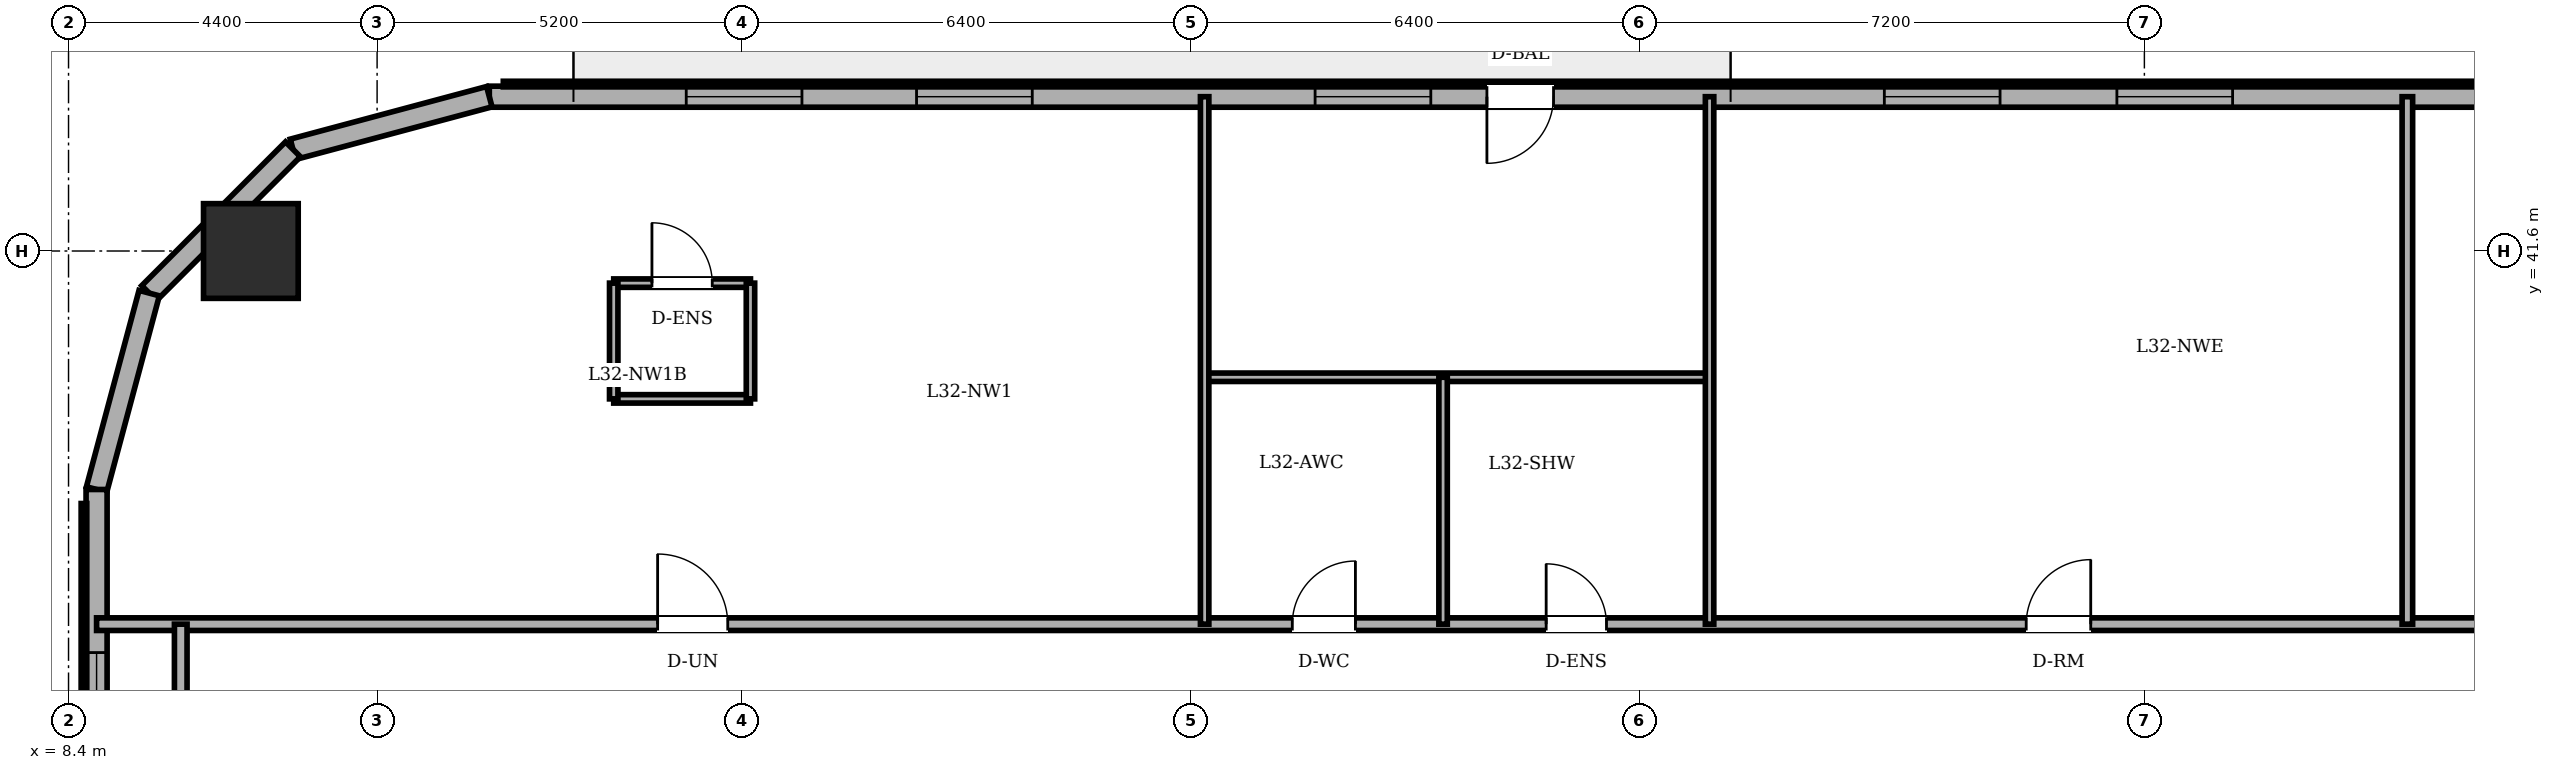
"""IFC4 building model, lengths in metres.
Left out: names, types, materials, properties, quantities, classifications, styles, units other than length and angle.
Written with IfcOpenShell. Run it as: python <this file> out.ifc"""

import sys

from ifc_helpers import new_model, si_unit, direction, frame, frame_2d, origin, origin_2d, place, context, subcontext, project, spatial, rectangle, circle, extrude, element, fill, save


model = new_model("IFC4")
c1 = context("Model", 3, precision=1e-05, world=origin(), true_north=direction((0.0, 1.0)))
c2 = subcontext(c1, "Body", "Model", "MODEL_VIEW")
j1 = project(units=[si_unit("LENGTHUNIT", "METRE"), si_unit("PLANEANGLEUNIT", "RADIAN")], contexts=[c1])
p1 = place(None, origin())
s1 = spatial("IfcSite", under=j1, at=p1, CompositionType="ELEMENT")
p2 = place(p1, origin())
s2 = spatial("IfcBuilding", under=s1, at=p2, CompositionType="ELEMENT")
p3 = place(p2, frame((0.0, 0.0, 122.3)))
s3 = spatial("IfcBuildingStorey", under=s2, at=p3, CompositionType="ELEMENT", Elevation=122.3)
p4 = place(p3, frame((11.0, 41.6, 0.0), z_axis=(0.0, 0.0, 1.0), x_axis=(1.0, 0.0, 0.0)))
e1 = element("IfcColumn", 1, at=p4, inside=s3, PredefinedType="COLUMN", context=c2, shape_type="SweptSolid", body=[
    extrude(circle(Radius=0.675, at=origin_2d()), origin(), (0.0, 0.0, 1.0), 3.6),
])
p5 = place(p3, frame((44.333, 43.8, 0.0), z_axis=(0.0, 0.0, 1.0), x_axis=(-1.0, 0.0, 0.0)))
e2 = element("IfcWall", 2, at=p5, inside=s3, PredefinedType="SOLIDWALL", context=c2, shape_type="SweptSolid", body=[
    extrude(rectangle(XDim=29.933, YDim=0.3, at=frame_2d((14.967, 0.0))), origin(), (0.0, 0.0, 1.0), 3.4),
])
p6 = place(p5, frame((14.758, 0.0, 0.0)))
e3 = element("IfcOpeningElement", 3, at=p6, cuts=e2, PredefinedType="OPENING", context=c2, shape_type="SweptSolid", body=[
    extrude(rectangle(XDim=0.95, YDim=2.2, at=frame_2d((0.475, 1.1))), frame((0.0, 0.16, 0.0), z_axis=(0.0, -1.0, 0.0), x_axis=(1.0, 0.0, 0.0)), (0.0, 0.0, 1.0), 0.32),
])
p7 = place(p5, frame((5.075, 0.0, 0.85)))
e4 = element("IfcOpeningElement", 4, at=p7, cuts=e2, PredefinedType="OPENING", context=c2, shape_type="SweptSolid", body=[
    extrude(rectangle(XDim=1.65, YDim=1.55, at=frame_2d((0.825, 0.775))), frame((0.0, 0.16, 0.0), z_axis=(0.0, -1.0, 0.0), x_axis=(1.0, 0.0, 0.0)), (0.0, 0.0, 1.0), 0.32),
])
p8 = place(p5, frame((8.391, 0.0, 0.85)))
e5 = element("IfcOpeningElement", 5, at=p8, cuts=e2, PredefinedType="OPENING", context=c2, shape_type="SweptSolid", body=[
    extrude(rectangle(XDim=1.65, YDim=1.55, at=frame_2d((0.825, 0.775))), frame((0.0, 0.16, 0.0), z_axis=(0.0, -1.0, 0.0), x_axis=(1.0, 0.0, 0.0)), (0.0, 0.0, 1.0), 0.32),
])
p9 = place(p5, frame((16.508, 0.0, 0.85)))
e6 = element("IfcOpeningElement", 6, at=p9, cuts=e2, PredefinedType="OPENING", context=c2, shape_type="SweptSolid", body=[
    extrude(rectangle(XDim=1.65, YDim=1.55, at=frame_2d((0.825, 0.775))), frame((0.0, 0.16, 0.0), z_axis=(0.0, -1.0, 0.0), x_axis=(1.0, 0.0, 0.0)), (0.0, 0.0, 1.0), 0.32),
])
p10 = place(p5, frame((22.191, 0.0, 0.85)))
e7 = element("IfcOpeningElement", 7, at=p10, cuts=e2, PredefinedType="OPENING", context=c2, shape_type="SweptSolid", body=[
    extrude(rectangle(XDim=1.65, YDim=1.55, at=frame_2d((0.825, 0.775))), frame((0.0, 0.16, 0.0), z_axis=(0.0, -1.0, 0.0), x_axis=(1.0, 0.0, 0.0)), (0.0, 0.0, 1.0), 0.32),
])
p11 = place(p5, frame((25.475, 0.0, 0.85)))
e8 = element("IfcOpeningElement", 8, at=p11, cuts=e2, PredefinedType="OPENING", context=c2, shape_type="SweptSolid", body=[
    extrude(rectangle(XDim=1.65, YDim=1.55, at=frame_2d((0.825, 0.775))), frame((0.0, 0.16, 0.0), z_axis=(0.0, -1.0, 0.0), x_axis=(1.0, 0.0, 0.0)), (0.0, 0.0, 1.0), 0.32),
])
p12 = place(p3, frame((14.4, 43.8, 0.0), z_axis=(0.0, 0.0, 1.0), x_axis=(-0.965943540406, -0.258752926066, 0.0)))
e9 = element("IfcWall", 9, at=p12, inside=s3, PredefinedType="SOLIDWALL", context=c2, shape_type="SweptSolid", body=[
    extrude(rectangle(XDim=2.898, YDim=0.3, at=frame_2d((1.449, 0.0))), origin(), (0.0, 0.0, 1.0), 3.4),
])
p13 = place(p3, frame((11.6, 43.05, 0.0), z_axis=(0.0, 0.0, 1.0), x_axis=(-0.707106781187, -0.707106781187, 0.0)))
e10 = element("IfcWall", 10, at=p13, inside=s3, PredefinedType="SOLIDWALL", context=c2, shape_type="SweptSolid", body=[
    extrude(rectangle(XDim=2.899, YDim=0.3, at=frame_2d((1.45, 0.0))), origin(), (0.0, 0.0, 1.0), 3.4),
])
p14 = place(p3, frame((9.55, 41.0, 0.0), z_axis=(0.0, 0.0, 1.0), x_axis=(-0.258731875344, -0.96594917914, 0.0)))
e11 = element("IfcWall", 11, at=p14, inside=s3, PredefinedType="SOLIDWALL", context=c2, shape_type="SweptSolid", body=[
    extrude(rectangle(XDim=2.899, YDim=0.3, at=frame_2d((1.449, 0.0))), origin(), (0.0, 0.0, 1.0), 3.4),
])
p15 = place(p3, frame((8.8, 38.2, 0.0), z_axis=(0.0, 0.0, 1.0), x_axis=(0.0, -1.0, 0.0)))
e12 = element("IfcWall", 12, at=p15, inside=s3, PredefinedType="SOLIDWALL", context=c2, shape_type="SweptSolid", body=[
    extrude(rectangle(XDim=28.4, YDim=0.3, at=frame_2d((14.2, 0.0))), origin(), (0.0, 0.0, 1.0), 3.4),
])
p16 = place(p15, frame((2.325, 0.0, 0.85)))
e13 = element("IfcOpeningElement", 13, at=p16, cuts=e12, PredefinedType="OPENING", context=c2, shape_type="SweptSolid", body=[
    extrude(rectangle(XDim=1.65, YDim=1.55, at=frame_2d((0.825, 0.775))), frame((0.0, 0.16, 0.0), z_axis=(0.0, -1.0, 0.0), x_axis=(1.0, 0.0, 0.0)), (0.0, 0.0, 1.0), 0.32),
])
p17 = place(p15, frame((6.828, 0.0, 0.85)))
e14 = element("IfcOpeningElement", 14, at=p17, cuts=e12, PredefinedType="OPENING", context=c2, shape_type="SweptSolid", body=[
    extrude(rectangle(XDim=1.65, YDim=1.55, at=frame_2d((0.825, 0.775))), frame((0.0, 0.16, 0.0), z_axis=(0.0, -1.0, 0.0), x_axis=(1.0, 0.0, 0.0)), (0.0, 0.0, 1.0), 0.32),
])
p18 = place(p15, frame((10.102, 0.0, 0.85)))
e15 = element("IfcOpeningElement", 15, at=p18, cuts=e12, PredefinedType="OPENING", context=c2, shape_type="SweptSolid", body=[
    extrude(rectangle(XDim=1.65, YDim=1.55, at=frame_2d((0.825, 0.775))), frame((0.0, 0.16, 0.0), z_axis=(0.0, -1.0, 0.0), x_axis=(1.0, 0.0, 0.0)), (0.0, 0.0, 1.0), 0.32),
])
p19 = place(p15, frame((16.648, 0.0, 0.85)))
e16 = element("IfcOpeningElement", 16, at=p19, cuts=e12, PredefinedType="OPENING", context=c2, shape_type="SweptSolid", body=[
    extrude(rectangle(XDim=1.65, YDim=1.55, at=frame_2d((0.825, 0.775))), frame((0.0, 0.16, 0.0), z_axis=(0.0, -1.0, 0.0), x_axis=(1.0, 0.0, 0.0)), (0.0, 0.0, 1.0), 0.32),
])
p20 = place(p15, frame((19.922, 0.0, 0.85)))
e17 = element("IfcOpeningElement", 17, at=p20, cuts=e12, PredefinedType="OPENING", context=c2, shape_type="SweptSolid", body=[
    extrude(rectangle(XDim=1.65, YDim=1.55, at=frame_2d((0.825, 0.775))), frame((0.0, 0.16, 0.0), z_axis=(0.0, -1.0, 0.0), x_axis=(1.0, 0.0, 0.0)), (0.0, 0.0, 1.0), 0.32),
])
p21 = place(p15, frame((24.425, 0.0, 0.85)))
e18 = element("IfcOpeningElement", 18, at=p21, cuts=e12, PredefinedType="OPENING", context=c2, shape_type="SweptSolid", body=[
    extrude(rectangle(XDim=1.65, YDim=1.55, at=frame_2d((0.825, 0.775))), frame((0.0, 0.16, 0.0), z_axis=(0.0, -1.0, 0.0), x_axis=(1.0, 0.0, 0.0)), (0.0, 0.0, 1.0), 0.32),
])
p22 = place(p3, frame((16.174, 41.142, 0.0), z_axis=(0.0, 0.0, 1.0), x_axis=(1.0, 0.0, 0.0)))
e19 = element("IfcWall", 19, at=p22, inside=s3, PredefinedType="PARTITIONING", context=c2, shape_type="SweptSolid", body=[
    extrude(rectangle(XDim=1.95, YDim=0.12, at=frame_2d((0.975, 0.0))), origin(), (0.0, 0.0, 1.0), 3.4),
])
p23 = place(p22, frame((0.545, 0.0, 0.0)))
e20 = element("IfcOpeningElement", 20, at=p23, cuts=e19, PredefinedType="OPENING", context=c2, shape_type="SweptSolid", body=[
    extrude(rectangle(XDim=0.86, YDim=2.1, at=frame_2d((0.43, 1.05))), frame((0.0, 0.07, 0.0), z_axis=(0.0, -1.0, 0.0), x_axis=(1.0, 0.0, 0.0)), (0.0, 0.0, 1.0), 0.14),
])
p24 = place(p3, frame((18.124, 39.492, 0.0), z_axis=(0.0, 0.0, 1.0), x_axis=(-1.0, 0.0, 0.0)))
e21 = element("IfcWall", 21, at=p24, inside=s3, PredefinedType="PARTITIONING", context=c2, shape_type="SweptSolid", body=[
    extrude(rectangle(XDim=1.95, YDim=0.12, at=frame_2d((0.975, 0.0))), origin(), (0.0, 0.0, 1.0), 3.4),
])
for number, where, z_axis, x_axis in (
    (22, (16.174, 41.142, 0.0), (0.0, 0.0, 1.0), (0.0, -1.0, 0.0)),
    (23, (18.124, 39.492, 0.0), (0.0, 0.0, 1.0), (0.0, 1.0, 0.0)),
):
    element("IfcWall", number, at=place(p3, frame(where, z_axis=z_axis, x_axis=x_axis)), inside=s3, PredefinedType="PARTITIONING", context=c2, shape_type="SweptSolid", body=[
        extrude(rectangle(XDim=1.65, YDim=0.12, at=frame_2d((0.825, 0.0))), origin(), (0.0, 0.0, 1.0), 3.4),
    ])
p25 = place(p3, frame((8.8, 36.28, 0.0), z_axis=(0.0, 0.0, 1.0), x_axis=(1.0, 0.0, 0.0)))
e24 = element("IfcWall", 24, at=p25, inside=s3, PredefinedType="PARTITIONING", context=c2, shape_type="SweptSolid", body=[
    extrude(rectangle(XDim=47.141, YDim=0.18, at=frame_2d((23.57, 0.0))), origin(), (0.0, 0.0, 1.0), 3.4),
])
p26 = place(p25, frame((17.05, 0.0, 0.0)))
e25 = element("IfcOpeningElement", 25, at=p26, cuts=e24, PredefinedType="OPENING", context=c2, shape_type="SweptSolid", body=[
    extrude(rectangle(XDim=0.9, YDim=2.1, at=frame_2d((0.45, 1.05))), frame((0.0, 0.1, 0.0), z_axis=(0.0, -1.0, 0.0), x_axis=(1.0, 0.0, 0.0)), (0.0, 0.0, 1.0), 0.2),
])
p27 = place(p25, frame((20.67, 0.0, 0.0)))
e26 = element("IfcOpeningElement", 26, at=p27, cuts=e24, PredefinedType="OPENING", context=c2, shape_type="SweptSolid", body=[
    extrude(rectangle(XDim=0.86, YDim=2.1, at=frame_2d((0.43, 1.05))), frame((0.0, 0.1, 0.0), z_axis=(0.0, -1.0, 0.0), x_axis=(1.0, 0.0, 0.0)), (0.0, 0.0, 1.0), 0.2),
])
p28 = place(p25, frame((34.95, 0.0, 0.0)))
e27 = element("IfcOpeningElement", 27, at=p28, cuts=e24, PredefinedType="OPENING", context=c2, shape_type="SweptSolid", body=[
    extrude(rectangle(XDim=1.0, YDim=2.15, at=frame_2d((0.5, 1.075))), frame((0.0, 0.1, 0.0), z_axis=(0.0, -1.0, 0.0), x_axis=(1.0, 0.0, 0.0)), (0.0, 0.0, 1.0), 0.2),
])
p29 = place(p25, frame((8.0, 0.0, 0.0)))
e28 = element("IfcOpeningElement", 28, at=p29, cuts=e24, PredefinedType="OPENING", context=c2, shape_type="SweptSolid", body=[
    extrude(rectangle(XDim=1.0, YDim=2.15, at=frame_2d((0.5, 1.075))), frame((0.0, 0.1, 0.0), z_axis=(0.0, -1.0, 0.0), x_axis=(1.0, 0.0, 0.0)), (0.0, 0.0, 1.0), 0.2),
])
p30 = place(p25, frame((27.515, 0.0, 0.0)))
e29 = element("IfcOpeningElement", 29, at=p30, cuts=e24, PredefinedType="OPENING", context=c2, shape_type="SweptSolid", body=[
    extrude(rectangle(XDim=0.92, YDim=2.1, at=frame_2d((0.46, 1.05))), frame((0.0, 0.1, 0.0), z_axis=(0.0, -1.0, 0.0), x_axis=(1.0, 0.0, 0.0)), (0.0, 0.0, 1.0), 0.2),
])
p31 = place(p3, frame((24.6, 39.8, 0.0), z_axis=(0.0, 0.0, 1.0), x_axis=(1.0, 0.0, 0.0)))
e30 = element("IfcWall", 30, at=p31, inside=s3, PredefinedType="PARTITIONING", context=c2, shape_type="SweptSolid", body=[
    extrude(rectangle(XDim=7.2, YDim=0.12, at=frame_2d((3.6, 0.0))), origin(), (0.0, 0.0, 1.0), 3.4),
])
p32 = place(p3, frame((10.0, 33.82, 0.0), z_axis=(0.0, 0.0, 1.0), x_axis=(0.0, 1.0, 0.0)))
e31 = element("IfcWall", 31, at=p32, inside=s3, PredefinedType="PARTITIONING", context=c2, shape_type="SweptSolid", body=[
    extrude(rectangle(XDim=2.46, YDim=0.18, at=frame_2d((1.23, 0.0))), origin(), (0.0, 0.0, 1.0), 3.4),
])
p33 = place(p3, frame((24.6, 36.28, 0.0), z_axis=(0.0, 0.0, 1.0), x_axis=(0.0, 1.0, 0.0)))
e32 = element("IfcWall", 32, at=p33, inside=s3, PredefinedType="PARTITIONING", context=c2, shape_type="SweptSolid", body=[
    extrude(rectangle(XDim=7.52, YDim=0.12, at=frame_2d((3.76, 0.0))), origin(), (0.0, 0.0, 1.0), 3.4),
])
p34 = place(p3, frame((28.0, 36.28, 0.0), z_axis=(0.0, 0.0, 1.0), x_axis=(0.0, 1.0, 0.0)))
e33 = element("IfcWall", 33, at=p34, inside=s3, PredefinedType="PARTITIONING", context=c2, shape_type="SweptSolid", body=[
    extrude(rectangle(XDim=3.52, YDim=0.12, at=frame_2d((1.76, 0.0))), origin(), (0.0, 0.0, 1.0), 3.4),
])
p35 = place(p3, frame((31.8, 36.28, 0.0), z_axis=(0.0, 0.0, 1.0), x_axis=(0.0, 1.0, 0.0)))
e34 = element("IfcWall", 34, at=p35, inside=s3, PredefinedType="PARTITIONING", context=c2, shape_type="SweptSolid", body=[
    extrude(rectangle(XDim=7.52, YDim=0.12, at=frame_2d((3.76, 0.0))), origin(), (0.0, 0.0, 1.0), 3.4),
])
p36 = place(p3, frame((41.75, 36.28, 0.0), z_axis=(0.0, 0.0, 1.0), x_axis=(0.0, 1.0, 0.0)))
e35 = element("IfcWall", 35, at=p36, inside=s3, PredefinedType="PARTITIONING", context=c2, shape_type="SweptSolid", body=[
    extrude(rectangle(XDim=7.52, YDim=0.15, at=frame_2d((3.76, 0.0))), origin(), (0.0, 0.0, 1.0), 3.4),
])
p37 = place(p6, origin())
e36 = element("IfcDoor", 36, at=p37, inside=s3, OperationType="SINGLE_SWING_RIGHT", PredefinedType="DOOR", context=c2, shape_type="SweptSolid", body=[
    extrude(rectangle(XDim=0.95, YDim=2.2, at=frame_2d((0.475, 1.1))), frame((0.0, 0.025, 0.0), z_axis=(0.0, -1.0, 0.0), x_axis=(1.0, 0.0, 0.0)), (0.0, 0.0, 1.0), 0.05),
])
fill(e3, e36)
p38 = place(p7, origin())
e37 = element("IfcWindow", 37, at=p38, inside=s3, PartitioningType="DOUBLE_PANEL_VERTICAL", PredefinedType="WINDOW", context=c2, shape_type="SweptSolid", body=[
    extrude(rectangle(XDim=1.65, YDim=1.55, at=frame_2d((0.825, 0.775))), frame((0.0, 0.03, 0.0), z_axis=(0.0, -1.0, 0.0), x_axis=(1.0, 0.0, 0.0)), (0.0, 0.0, 1.0), 0.06),
])
fill(e4, e37)
p39 = place(p8, origin())
e38 = element("IfcWindow", 38, at=p39, inside=s3, PartitioningType="DOUBLE_PANEL_VERTICAL", PredefinedType="WINDOW", context=c2, shape_type="SweptSolid", body=[
    extrude(rectangle(XDim=1.65, YDim=1.55, at=frame_2d((0.825, 0.775))), frame((0.0, 0.03, 0.0), z_axis=(0.0, -1.0, 0.0), x_axis=(1.0, 0.0, 0.0)), (0.0, 0.0, 1.0), 0.06),
])
fill(e5, e38)
p40 = place(p9, origin())
e39 = element("IfcWindow", 39, at=p40, inside=s3, PartitioningType="DOUBLE_PANEL_VERTICAL", PredefinedType="WINDOW", context=c2, shape_type="SweptSolid", body=[
    extrude(rectangle(XDim=1.65, YDim=1.55, at=frame_2d((0.825, 0.775))), frame((0.0, 0.03, 0.0), z_axis=(0.0, -1.0, 0.0), x_axis=(1.0, 0.0, 0.0)), (0.0, 0.0, 1.0), 0.06),
])
fill(e6, e39)
p41 = place(p10, origin())
e40 = element("IfcWindow", 40, at=p41, inside=s3, PartitioningType="DOUBLE_PANEL_VERTICAL", PredefinedType="WINDOW", context=c2, shape_type="SweptSolid", body=[
    extrude(rectangle(XDim=1.65, YDim=1.55, at=frame_2d((0.825, 0.775))), frame((0.0, 0.03, 0.0), z_axis=(0.0, -1.0, 0.0), x_axis=(1.0, 0.0, 0.0)), (0.0, 0.0, 1.0), 0.06),
])
fill(e7, e40)
p42 = place(p11, origin())
e41 = element("IfcWindow", 41, at=p42, inside=s3, PartitioningType="DOUBLE_PANEL_VERTICAL", PredefinedType="WINDOW", context=c2, shape_type="SweptSolid", body=[
    extrude(rectangle(XDim=1.65, YDim=1.55, at=frame_2d((0.825, 0.775))), frame((0.0, 0.03, 0.0), z_axis=(0.0, -1.0, 0.0), x_axis=(1.0, 0.0, 0.0)), (0.0, 0.0, 1.0), 0.06),
])
fill(e8, e41)
p43 = place(p16, origin())
e42 = element("IfcWindow", 42, at=p43, inside=s3, PartitioningType="DOUBLE_PANEL_VERTICAL", PredefinedType="WINDOW", context=c2, shape_type="SweptSolid", body=[
    extrude(rectangle(XDim=1.65, YDim=1.55, at=frame_2d((0.825, 0.775))), frame((0.0, 0.03, 0.0), z_axis=(0.0, -1.0, 0.0), x_axis=(1.0, 0.0, 0.0)), (0.0, 0.0, 1.0), 0.06),
])
fill(e13, e42)
p44 = place(p23, origin())
e43 = element("IfcDoor", 43, at=p44, inside=s3, OperationType="SINGLE_SWING_LEFT", PredefinedType="DOOR", context=c2, shape_type="SweptSolid", body=[
    extrude(rectangle(XDim=0.86, YDim=2.1, at=frame_2d((0.43, 1.05))), frame((0.0, 0.025, 0.0), z_axis=(0.0, -1.0, 0.0), x_axis=(1.0, 0.0, 0.0)), (0.0, 0.0, 1.0), 0.05),
])
fill(e20, e43)
p45 = place(p26, origin())
e44 = element("IfcDoor", 44, at=p45, inside=s3, OperationType="SINGLE_SWING_RIGHT", PredefinedType="DOOR", context=c2, shape_type="SweptSolid", body=[
    extrude(rectangle(XDim=0.9, YDim=2.1, at=frame_2d((0.45, 1.05))), frame((0.0, 0.025, 0.0), z_axis=(0.0, -1.0, 0.0), x_axis=(1.0, 0.0, 0.0)), (0.0, 0.0, 1.0), 0.05),
])
fill(e25, e44)
p46 = place(p27, origin())
e45 = element("IfcDoor", 45, at=p46, inside=s3, OperationType="SINGLE_SWING_LEFT", PredefinedType="DOOR", context=c2, shape_type="SweptSolid", body=[
    extrude(rectangle(XDim=0.86, YDim=2.1, at=frame_2d((0.43, 1.05))), frame((0.0, 0.025, 0.0), z_axis=(0.0, -1.0, 0.0), x_axis=(1.0, 0.0, 0.0)), (0.0, 0.0, 1.0), 0.05),
])
fill(e26, e45)
p47 = place(p29, origin())
e46 = element("IfcDoor", 46, at=p47, inside=s3, OperationType="SINGLE_SWING_LEFT", PredefinedType="DOOR", context=c2, shape_type="SweptSolid", body=[
    extrude(rectangle(XDim=1.0, YDim=2.15, at=frame_2d((0.5, 1.075))), frame((0.0, 0.025, 0.0), z_axis=(0.0, -1.0, 0.0), x_axis=(1.0, 0.0, 0.0)), (0.0, 0.0, 1.0), 0.05),
])
fill(e28, e46)
p48 = place(p30, origin())
e47 = element("IfcDoor", 47, at=p48, inside=s3, OperationType="SINGLE_SWING_RIGHT", PredefinedType="DOOR", context=c2, shape_type="SweptSolid", body=[
    extrude(rectangle(XDim=0.92, YDim=2.1, at=frame_2d((0.46, 1.05))), frame((0.0, 0.025, 0.0), z_axis=(0.0, -1.0, 0.0), x_axis=(1.0, 0.0, 0.0)), (0.0, 0.0, 1.0), 0.05),
])
fill(e29, e47)
save(model, sys.argv[1])
